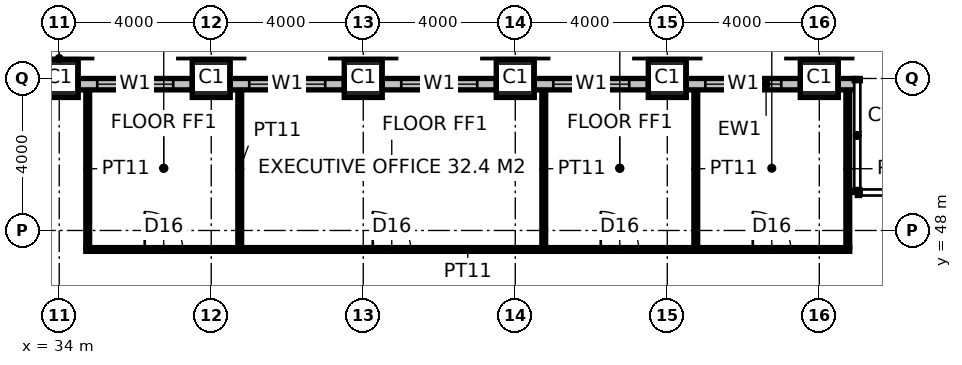
"""IFC4 building model, lengths in metres.
Left out: names, types, materials, properties, quantities, classifications, styles, units other than length and angle.
Written with IfcOpenShell. Run it as: python <this file> out.ifc"""

import sys

from ifc_helpers import new_model, si_unit, direction, frame, frame_2d, origin, origin_2d, place, context, subcontext, project, spatial, rectangle, hollow_rectangle, extrude, element, fill, save


model = new_model("IFC4")
c1 = context("Model", 3, precision=1e-05, world=origin(), true_north=direction((0.0, 1.0)))
c2 = subcontext(c1, "Body", "Model", "MODEL_VIEW")
j1 = project(units=[si_unit("LENGTHUNIT", "METRE"), si_unit("PLANEANGLEUNIT", "RADIAN")], contexts=[c1])
p1 = place(None, origin())
s1 = spatial("IfcSite", under=j1, at=p1, CompositionType="ELEMENT")
p2 = place(p1, origin())
s2 = spatial("IfcBuilding", under=s1, at=p2, CompositionType="ELEMENT")
p3 = place(p2, frame((0.0, 0.0, 109.4)))
s3 = spatial("IfcBuildingStorey", under=s2, at=p3, CompositionType="ELEMENT", Elevation=109.4)
for number, where, z_axis, x_axis in (
    (1, (34.0, 52.0, 0.0), (0.0, 0.0, 1.0), (1.0, 0.0, 0.0)),
    (2, (38.0, 52.0, 0.0), (0.0, 0.0, 1.0), (1.0, 0.0, 0.0)),
    (3, (42.0, 52.0, 0.0), (0.0, 0.0, 1.0), (1.0, 0.0, 0.0)),
    (4, (46.0, 52.0, 0.0), (0.0, 0.0, 1.0), (1.0, 0.0, 0.0)),
    (5, (50.0, 52.0, 0.0), (0.0, 0.0, 1.0), (1.0, 0.0, 0.0)),
    (6, (54.0, 52.0, 0.0), (0.0, 0.0, 1.0), (1.0, 0.0, 0.0)),
):
    element("IfcColumn", number, at=place(p3, frame(where, z_axis=z_axis, x_axis=x_axis)), inside=s3, PredefinedType="COLUMN", context=c2, shape_type="SweptSolid", body=[
        extrude(hollow_rectangle(XDim=1.0, YDim=1.0, WallThickness=0.1, at=origin_2d()), origin(), (0.0, 0.0, 1.0), 4.0),
    ])
p4 = place(p3, frame((34.7, 47.5, 0.0), z_axis=(0.0, 0.0, 1.0), x_axis=(1.0, 0.0, 0.0)))
e7 = element("IfcWall", 7, at=p4, inside=s3, PredefinedType="PARTITIONING", context=c2, shape_type="SweptSolid", body=[
    extrude(rectangle(XDim=20.1, YDim=0.1, at=frame_2d((10.05, 0.0))), origin(), (0.0, 0.0, 1.0), 3.85),
])
p5 = place(p4, frame((1.55, 0.0, 0.0)))
e8 = element("IfcOpeningElement", 8, at=p5, cuts=e7, PredefinedType="OPENING", context=c2, shape_type="SweptSolid", body=[
    extrude(rectangle(XDim=1.0, YDim=2.2, at=frame_2d((0.5, 1.1))), frame((0.0, 0.06, 0.0), z_axis=(0.0, -1.0, 0.0), x_axis=(1.0, 0.0, 0.0)), (0.0, 0.0, 1.0), 0.12),
])
p6 = place(p4, frame((7.55, 0.0, 0.0)))
e9 = element("IfcOpeningElement", 9, at=p6, cuts=e7, PredefinedType="OPENING", context=c2, shape_type="SweptSolid", body=[
    extrude(rectangle(XDim=1.0, YDim=2.2, at=frame_2d((0.5, 1.1))), frame((0.0, 0.06, 0.0), z_axis=(0.0, -1.0, 0.0), x_axis=(1.0, 0.0, 0.0)), (0.0, 0.0, 1.0), 0.12),
])
p7 = place(p4, frame((13.55, 0.0, 0.0)))
e10 = element("IfcOpeningElement", 10, at=p7, cuts=e7, PredefinedType="OPENING", context=c2, shape_type="SweptSolid", body=[
    extrude(rectangle(XDim=1.0, YDim=2.2, at=frame_2d((0.5, 1.1))), frame((0.0, 0.06, 0.0), z_axis=(0.0, -1.0, 0.0), x_axis=(1.0, 0.0, 0.0)), (0.0, 0.0, 1.0), 0.12),
])
p8 = place(p4, frame((17.55, 0.0, 0.0)))
e11 = element("IfcOpeningElement", 11, at=p8, cuts=e7, PredefinedType="OPENING", context=c2, shape_type="SweptSolid", body=[
    extrude(rectangle(XDim=1.0, YDim=2.2, at=frame_2d((0.5, 1.1))), frame((0.0, 0.06, 0.0), z_axis=(0.0, -1.0, 0.0), x_axis=(1.0, 0.0, 0.0)), (0.0, 0.0, 1.0), 0.12),
])
for number, where, z_axis, x_axis in (
    (12, (34.75, 47.55, 0.0), (0.0, 0.0, 1.0), (0.0, 1.0, 0.0)),
    (13, (38.75, 47.55, 0.0), (0.0, 0.0, 1.0), (0.0, 1.0, 0.0)),
    (14, (46.75, 47.55, 0.0), (0.0, 0.0, 1.0), (0.0, 1.0, 0.0)),
    (15, (50.75, 47.55, 0.0), (0.0, 0.0, 1.0), (0.0, 1.0, 0.0)),
    (16, (54.75, 47.55, 0.0), (0.0, 0.0, 1.0), (0.0, 1.0, 0.0)),
):
    element("IfcWall", number, at=place(p3, frame(where, z_axis=z_axis, x_axis=x_axis)), inside=s3, PredefinedType="PARTITIONING", context=c2, shape_type="SweptSolid", body=[
        extrude(rectangle(XDim=4.15, YDim=0.1, at=frame_2d((2.075, 0.0))), origin(), (0.0, 0.0, 1.0), 3.85),
    ])
p9 = place(p3, frame((37.5, 51.85, 0.0), z_axis=(0.0, 0.0, 1.0), x_axis=(-1.0, 0.0, 0.0)))
e17 = element("IfcWall", 17, at=p9, inside=s3, PredefinedType="ELEMENTEDWALL", context=c2, shape_type="SweptSolid", body=[
    extrude(rectangle(XDim=3.0, YDim=0.3, at=frame_2d((1.5, 0.0))), origin(), (0.0, 0.0, 1.0), 2.85),
])
p10 = place(p9, frame((0.5, 0.0, 0.8)))
e18 = element("IfcOpeningElement", 18, at=p10, cuts=e17, PredefinedType="OPENING", context=c2, shape_type="SweptSolid", body=[
    extrude(rectangle(XDim=2.0, YDim=2.0, at=frame_2d((1.0, 1.0))), frame((0.0, 0.16, 0.0), z_axis=(0.0, -1.0, 0.0), x_axis=(1.0, 0.0, 0.0)), (0.0, 0.0, 1.0), 0.32),
])
p11 = place(p3, frame((41.5, 51.85, 0.0), z_axis=(0.0, 0.0, 1.0), x_axis=(-1.0, 0.0, 0.0)))
e19 = element("IfcWall", 19, at=p11, inside=s3, PredefinedType="ELEMENTEDWALL", context=c2, shape_type="SweptSolid", body=[
    extrude(rectangle(XDim=3.0, YDim=0.3, at=frame_2d((1.5, 0.0))), origin(), (0.0, 0.0, 1.0), 2.85),
])
p12 = place(p11, frame((0.5, 0.0, 0.8)))
e20 = element("IfcOpeningElement", 20, at=p12, cuts=e19, PredefinedType="OPENING", context=c2, shape_type="SweptSolid", body=[
    extrude(rectangle(XDim=2.0, YDim=2.0, at=frame_2d((1.0, 1.0))), frame((0.0, 0.16, 0.0), z_axis=(0.0, -1.0, 0.0), x_axis=(1.0, 0.0, 0.0)), (0.0, 0.0, 1.0), 0.32),
])
p13 = place(p3, frame((45.5, 51.85, 0.0), z_axis=(0.0, 0.0, 1.0), x_axis=(-1.0, 0.0, 0.0)))
e21 = element("IfcWall", 21, at=p13, inside=s3, PredefinedType="ELEMENTEDWALL", context=c2, shape_type="SweptSolid", body=[
    extrude(rectangle(XDim=3.0, YDim=0.3, at=frame_2d((1.5, 0.0))), origin(), (0.0, 0.0, 1.0), 2.85),
])
p14 = place(p13, frame((0.5, 0.0, 0.8)))
e22 = element("IfcOpeningElement", 22, at=p14, cuts=e21, PredefinedType="OPENING", context=c2, shape_type="SweptSolid", body=[
    extrude(rectangle(XDim=2.0, YDim=2.0, at=frame_2d((1.0, 1.0))), frame((0.0, 0.16, 0.0), z_axis=(0.0, -1.0, 0.0), x_axis=(1.0, 0.0, 0.0)), (0.0, 0.0, 1.0), 0.32),
])
p15 = place(p3, frame((49.5, 51.85, 0.0), z_axis=(0.0, 0.0, 1.0), x_axis=(-1.0, 0.0, 0.0)))
e23 = element("IfcWall", 23, at=p15, inside=s3, PredefinedType="ELEMENTEDWALL", context=c2, shape_type="SweptSolid", body=[
    extrude(rectangle(XDim=3.0, YDim=0.3, at=frame_2d((1.5, 0.0))), origin(), (0.0, 0.0, 1.0), 2.85),
])
p16 = place(p15, frame((0.5, 0.0, 0.8)))
e24 = element("IfcOpeningElement", 24, at=p16, cuts=e23, PredefinedType="OPENING", context=c2, shape_type="SweptSolid", body=[
    extrude(rectangle(XDim=2.0, YDim=2.0, at=frame_2d((1.0, 1.0))), frame((0.0, 0.16, 0.0), z_axis=(0.0, -1.0, 0.0), x_axis=(1.0, 0.0, 0.0)), (0.0, 0.0, 1.0), 0.32),
])
p17 = place(p3, frame((53.5, 51.85, 0.0), z_axis=(0.0, 0.0, 1.0), x_axis=(-1.0, 0.0, 0.0)))
e25 = element("IfcWall", 25, at=p17, inside=s3, PredefinedType="ELEMENTEDWALL", context=c2, shape_type="SweptSolid", body=[
    extrude(rectangle(XDim=3.0, YDim=0.3, at=frame_2d((1.5, 0.0))), origin(), (0.0, 0.0, 1.0), 2.85),
])
p18 = place(p17, frame((0.5, 0.0, 0.8)))
e26 = element("IfcOpeningElement", 26, at=p18, cuts=e25, PredefinedType="OPENING", context=c2, shape_type="SweptSolid", body=[
    extrude(rectangle(XDim=2.0, YDim=2.0, at=frame_2d((1.0, 1.0))), frame((0.0, 0.16, 0.0), z_axis=(0.0, -1.0, 0.0), x_axis=(1.0, 0.0, 0.0)), (0.0, 0.0, 1.0), 0.32),
])
p19 = place(p3, frame((54.97, 51.85, 0.0), z_axis=(0.0, 0.0, 1.0), x_axis=(-1.0, 0.0, 0.0)))
e27 = element("IfcWall", 27, at=p19, inside=s3, PredefinedType="ELEMENTEDWALL", context=c2, shape_type="SweptSolid", body=[
    extrude(rectangle(XDim=0.47, YDim=0.3, at=frame_2d((0.235, 0.0))), origin(), (0.0, 0.0, 1.0), 2.95),
])
p20 = place(p5, origin())
e28 = element("IfcDoor", 28, at=p20, inside=s3, OperationType="SINGLE_SWING_LEFT", PredefinedType="DOOR", context=c2, shape_type="SweptSolid", body=[
    extrude(rectangle(XDim=1.0, YDim=2.2, at=frame_2d((0.5, 1.1))), frame((0.0, 0.025, 0.0), z_axis=(0.0, -1.0, 0.0), x_axis=(1.0, 0.0, 0.0)), (0.0, 0.0, 1.0), 0.05),
])
fill(e8, e28)
p21 = place(p6, origin())
e29 = element("IfcDoor", 29, at=p21, inside=s3, OperationType="SINGLE_SWING_LEFT", PredefinedType="DOOR", context=c2, shape_type="SweptSolid", body=[
    extrude(rectangle(XDim=1.0, YDim=2.2, at=frame_2d((0.5, 1.1))), frame((0.0, 0.025, 0.0), z_axis=(0.0, -1.0, 0.0), x_axis=(1.0, 0.0, 0.0)), (0.0, 0.0, 1.0), 0.05),
])
fill(e9, e29)
p22 = place(p7, origin())
e30 = element("IfcDoor", 30, at=p22, inside=s3, OperationType="SINGLE_SWING_LEFT", PredefinedType="DOOR", context=c2, shape_type="SweptSolid", body=[
    extrude(rectangle(XDim=1.0, YDim=2.2, at=frame_2d((0.5, 1.1))), frame((0.0, 0.025, 0.0), z_axis=(0.0, -1.0, 0.0), x_axis=(1.0, 0.0, 0.0)), (0.0, 0.0, 1.0), 0.05),
])
fill(e10, e30)
p23 = place(p8, origin())
e31 = element("IfcDoor", 31, at=p23, inside=s3, OperationType="SINGLE_SWING_LEFT", PredefinedType="DOOR", context=c2, shape_type="SweptSolid", body=[
    extrude(rectangle(XDim=1.0, YDim=2.2, at=frame_2d((0.5, 1.1))), frame((0.0, 0.025, 0.0), z_axis=(0.0, -1.0, 0.0), x_axis=(1.0, 0.0, 0.0)), (0.0, 0.0, 1.0), 0.05),
])
fill(e11, e31)
p24 = place(p10, origin())
e32 = element("IfcWindow", 32, at=p24, inside=s3, PartitioningType="SINGLE_PANEL", PredefinedType="WINDOW", context=c2, shape_type="SweptSolid", body=[
    extrude(rectangle(XDim=2.0, YDim=2.0, at=frame_2d((1.0, 1.0))), frame((0.0, 0.03, 0.0), z_axis=(0.0, -1.0, 0.0), x_axis=(1.0, 0.0, 0.0)), (0.0, 0.0, 1.0), 0.06),
])
fill(e18, e32)
p25 = place(p12, origin())
e33 = element("IfcWindow", 33, at=p25, inside=s3, PartitioningType="SINGLE_PANEL", PredefinedType="WINDOW", context=c2, shape_type="SweptSolid", body=[
    extrude(rectangle(XDim=2.0, YDim=2.0, at=frame_2d((1.0, 1.0))), frame((0.0, 0.03, 0.0), z_axis=(0.0, -1.0, 0.0), x_axis=(1.0, 0.0, 0.0)), (0.0, 0.0, 1.0), 0.06),
])
fill(e20, e33)
p26 = place(p14, origin())
e34 = element("IfcWindow", 34, at=p26, inside=s3, PartitioningType="SINGLE_PANEL", PredefinedType="WINDOW", context=c2, shape_type="SweptSolid", body=[
    extrude(rectangle(XDim=2.0, YDim=2.0, at=frame_2d((1.0, 1.0))), frame((0.0, 0.03, 0.0), z_axis=(0.0, -1.0, 0.0), x_axis=(1.0, 0.0, 0.0)), (0.0, 0.0, 1.0), 0.06),
])
fill(e22, e34)
p27 = place(p16, origin())
e35 = element("IfcWindow", 35, at=p27, inside=s3, PartitioningType="SINGLE_PANEL", PredefinedType="WINDOW", context=c2, shape_type="SweptSolid", body=[
    extrude(rectangle(XDim=2.0, YDim=2.0, at=frame_2d((1.0, 1.0))), frame((0.0, 0.03, 0.0), z_axis=(0.0, -1.0, 0.0), x_axis=(1.0, 0.0, 0.0)), (0.0, 0.0, 1.0), 0.06),
])
fill(e24, e35)
p28 = place(p18, origin())
e36 = element("IfcWindow", 36, at=p28, inside=s3, PartitioningType="SINGLE_PANEL", PredefinedType="WINDOW", context=c2, shape_type="SweptSolid", body=[
    extrude(rectangle(XDim=2.0, YDim=2.0, at=frame_2d((1.0, 1.0))), frame((0.0, 0.03, 0.0), z_axis=(0.0, -1.0, 0.0), x_axis=(1.0, 0.0, 0.0)), (0.0, 0.0, 1.0), 0.06),
])
fill(e26, e36)
save(model, sys.argv[1])
